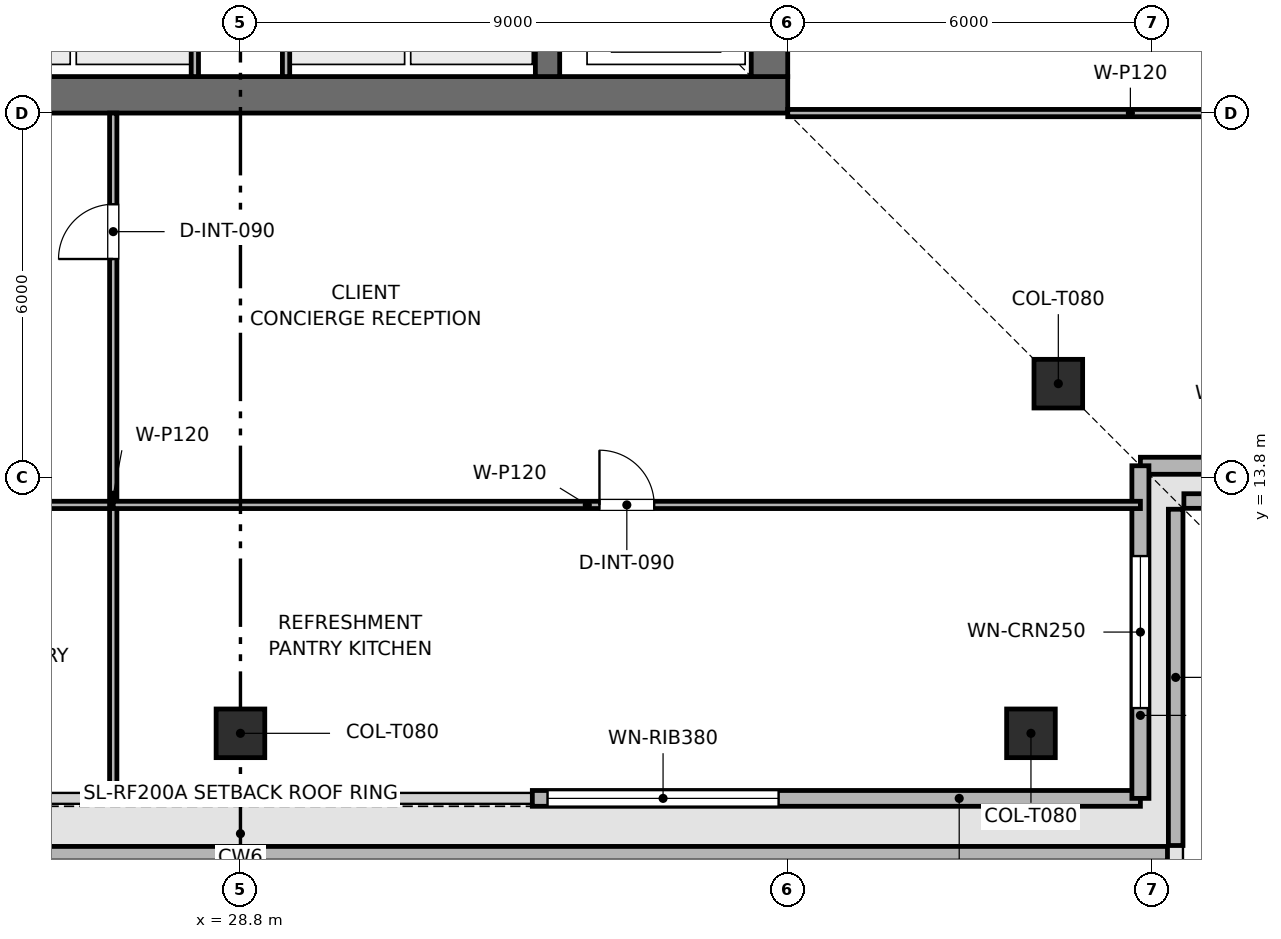
"""IFC4 building model, lengths in metres.
Left out: names, types, materials, properties, quantities, classifications, styles, units other than length and angle.
Written with IfcOpenShell. Run it as: python <this file> out.ifc"""

import sys

from ifc_helpers import new_model, si_unit, direction, frame, frame_2d, origin, origin_2d, place, context, subcontext, project, spatial, rectangle, extrude, element, fill, save


model = new_model("IFC4")
c1 = context("Model", 3, precision=1e-05, world=origin(), true_north=direction((0.0, 1.0)))
c2 = subcontext(c1, "Body", "Model", "MODEL_VIEW")
j1 = project(units=[si_unit("LENGTHUNIT", "METRE"), si_unit("PLANEANGLEUNIT", "RADIAN")], contexts=[c1])
p1 = place(None, origin())
s1 = spatial("IfcSite", under=j1, at=p1, CompositionType="ELEMENT")
p2 = place(p1, origin())
s2 = spatial("IfcBuilding", under=s1, at=p2, CompositionType="ELEMENT")
p3 = place(p2, frame((0.0, 0.0, 355.5)))
s3 = spatial("IfcBuildingStorey", under=s2, at=p3, CompositionType="ELEMENT", Elevation=355.5)
p4 = place(p3, frame((19.8, 20.1, 0.0), z_axis=(0.0, 0.0, 1.0), x_axis=(1.0, 0.0, 0.0)))
e1 = element("IfcWall", 1, at=p4, inside=s3, PredefinedType="SHEAR", context=c2, shape_type="SweptSolid", body=[
    extrude(rectangle(XDim=18.0, YDim=0.6, at=frame_2d((9.0, 0.0))), origin(), (0.0, 0.0, 1.0), 4.5),
])
p5 = place(p3, frame((37.5, 20.4, 0.0), z_axis=(0.0, 0.0, 1.0), x_axis=(0.0, 1.0, 0.0)))
e2 = element("IfcWall", 2, at=p5, inside=s3, PredefinedType="SHEAR", context=c2, shape_type="SweptSolid", body=[
    extrude(rectangle(XDim=16.8, YDim=0.6, at=frame_2d((8.4, 0.0))), origin(), (0.0, 0.0, 1.0), 4.5),
])
p6 = place(p5, frame((4.9, 0.0, 0.0)))
e3 = element("IfcOpeningElement", 3, at=p6, cuts=e2, PredefinedType="OPENING", context=c2, shape_type="SweptSolid", body=[
    extrude(rectangle(XDim=1.1, YDim=2.15, at=frame_2d((0.55, 1.075))), frame((0.0, 0.31, 0.0), z_axis=(0.0, -1.0, 0.0), x_axis=(1.0, 0.0, 0.0)), (0.0, 0.0, 1.0), 0.62),
])
p7 = place(p3, frame((33.85, 20.4, 0.0), z_axis=(0.0, 0.0, 1.0), x_axis=(0.0, 1.0, 0.0)))
e4 = element("IfcWall", 4, at=p7, inside=s3, PredefinedType="SHEAR", context=c2, shape_type="SweptSolid", body=[
    extrude(rectangle(XDim=16.8, YDim=0.4, at=frame_2d((8.4, 0.0))), origin(), (0.0, 0.0, 1.0), 4.5),
])
for number, where, z_axis, x_axis in (
    (5, (28.8, 9.6, 0.003), (0.0, 0.0, 1.0), (1.0, 0.0, 0.0)),
    (6, (41.8, 9.6, 0.003), (0.0, 0.0, 1.0), (1.0, 0.0, 0.0)),
    (7, (42.25, 15.35, 0.003), (0.0, 0.0, 1.0), (1.0, 0.0, 0.0)),
):
    element("IfcColumn", number, at=place(p3, frame(where, z_axis=z_axis, x_axis=x_axis)), inside=s3, PredefinedType="COLUMN", context=c2, shape_type="SweptSolid", body=[
        extrude(rectangle(XDim=0.8, YDim=0.8, at=origin_2d()), origin(), (0.0, 0.0, 1.0), 4.234),
    ])
p8 = place(p3, frame((13.555, 7.62, 0.0), z_axis=(0.0, 0.0, 1.0), x_axis=(1.0, 0.0, 0.0)))
e8 = element("IfcWall", 8, at=p8, inside=s3, PredefinedType="PARAPET", context=c2, shape_type="SweptSolid", body=[
    extrude(rectangle(XDim=30.49, YDim=0.24, at=frame_2d((15.245, 0.0))), origin(), (0.0, 0.0, 1.0), 1.2),
])
for number, where, z_axis, x_axis in (
    (9, (44.18, 7.755, 0.0), (0.0, 0.0, 1.0), (0.0, 1.0, 0.0)),
    (10, (44.315, 13.42, 0.0), (0.0, 0.0, 1.0), (1.0, 0.0, 0.0)),
):
    element("IfcWall", number, at=place(p3, frame(where, z_axis=z_axis, x_axis=x_axis)), inside=s3, PredefinedType="PARAPET", context=c2, shape_type="SweptSolid", body=[
        extrude(rectangle(XDim=5.53, YDim=0.24, at=frame_2d((2.765, 0.0))), origin(), (0.0, 0.0, 1.0), 1.2),
    ])
p9 = place(p3, frame((43.6, 8.53, 0.0), z_axis=(0.0, 0.0, 1.0), x_axis=(-1.0, 0.0, 0.0)))
e11 = element("IfcWall", 11, at=p9, inside=s3, PredefinedType="SOLIDWALL", context=c2, shape_type="SweptSolid", body=[
    extrude(rectangle(XDim=10.0, YDim=0.26, at=frame_2d((5.0, 0.0))), origin(), (0.0, 0.0, 1.0), 4.24),
])
p10 = place(p9, frame((5.95, 0.0, 0.9)))
e12 = element("IfcOpeningElement", 12, at=p10, cuts=e11, PredefinedType="OPENING", context=c2, shape_type="SweptSolid", body=[
    extrude(rectangle(XDim=3.8, YDim=1.9, at=frame_2d((1.9, 0.95))), frame((0.0, 0.14, 0.0), z_axis=(0.0, -1.0, 0.0), x_axis=(1.0, 0.0, 0.0)), (0.0, 0.0, 1.0), 0.28),
])
p11 = place(p3, frame((49.07, 14.0, 0.0), z_axis=(0.0, 0.0, 1.0), x_axis=(-1.0, 0.0, 0.0)))
e13 = element("IfcWall", 13, at=p11, inside=s3, PredefinedType="SOLIDWALL", context=c2, shape_type="SweptSolid", body=[
    extrude(rectangle(XDim=5.47, YDim=0.28, at=frame_2d((2.735, 0.0))), origin(), (0.0, 0.0, 1.0), 4.24),
])
p12 = place(p11, frame((1.485, 0.0, 0.9)))
e14 = element("IfcOpeningElement", 14, at=p12, cuts=e13, PredefinedType="OPENING", context=c2, shape_type="SweptSolid", body=[
    extrude(rectangle(XDim=2.5, YDim=1.9, at=frame_2d((1.25, 0.95))), frame((0.0, 0.15, 0.0), z_axis=(0.0, -1.0, 0.0), x_axis=(1.0, 0.0, 0.0)), (0.0, 0.0, 1.0), 0.3),
])
p13 = place(p3, frame((43.6, 14.0, 0.0), z_axis=(0.0, 0.0, 1.0), x_axis=(0.0, -1.0, 0.0)))
e15 = element("IfcWall", 15, at=p13, inside=s3, PredefinedType="SOLIDWALL", context=c2, shape_type="SweptSolid", body=[
    extrude(rectangle(XDim=5.47, YDim=0.28, at=frame_2d((2.735, 0.0))), origin(), (0.0, 0.0, 1.0), 4.24),
])
p14 = place(p13, frame((1.485, 0.0, 0.9)))
e16 = element("IfcOpeningElement", 16, at=p14, cuts=e15, PredefinedType="OPENING", context=c2, shape_type="SweptSolid", body=[
    extrude(rectangle(XDim=2.5, YDim=1.9, at=frame_2d((1.25, 0.95))), frame((0.0, 0.15, 0.0), z_axis=(0.0, -1.0, 0.0), x_axis=(1.0, 0.0, 0.0)), (0.0, 0.0, 1.0), 0.3),
])
for number, where, z_axis, x_axis in (
    (17, (28.05, 20.4, 0.0), (0.0, 0.0, 1.0), (0.0, 1.0, 0.0)),
    (18, (29.55, 20.4, 0.0), (0.0, 0.0, 1.0), (0.0, 1.0, 0.0)),
):
    element("IfcWall", number, at=place(p3, frame(where, z_axis=z_axis, x_axis=x_axis)), inside=s3, PredefinedType="PARTITIONING", context=c2, shape_type="SweptSolid", body=[
        extrude(rectangle(XDim=2.75, YDim=0.12, at=frame_2d((1.375, 0.0))), origin(), (0.0, 0.0, 1.0), 4.24),
    ])
p15 = place(p3, frame((19.8, 13.356, 0.0), z_axis=(0.0, 0.0, 1.0), x_axis=(1.0, 0.0, 0.0)))
e19 = element("IfcWall", 19, at=p15, inside=s3, PredefinedType="PARTITIONING", context=c2, shape_type="SweptSolid", body=[
    extrude(rectangle(XDim=6.908, YDim=0.12, at=frame_2d((3.454, 0.0))), origin(), (0.0, 0.0, 1.0), 3.825),
])
p16 = place(p15, frame((2.303, 0.0, 0.0)))
e20 = element("IfcOpeningElement", 20, at=p16, cuts=e19, PredefinedType="OPENING", context=c2, shape_type="SweptSolid", body=[
    extrude(rectangle(XDim=0.9, YDim=2.1, at=frame_2d((0.45, 1.05))), frame((0.0, 0.07, 0.0), z_axis=(0.0, -1.0, 0.0), x_axis=(1.0, 0.0, 0.0)), (0.0, 0.0, 1.0), 0.14),
])
p17 = place(p3, frame((26.708, 8.53, 0.0), z_axis=(0.0, 0.0, 1.0), x_axis=(0.0, 1.0, 0.0)))
e21 = element("IfcWall", 21, at=p17, inside=s3, PredefinedType="PARTITIONING", context=c2, shape_type="SweptSolid", body=[
    extrude(rectangle(XDim=11.27, YDim=0.12, at=frame_2d((5.635, 0.0))), origin(), (0.0, 0.0, 1.0), 3.865),
])
p18 = place(p17, frame((8.87, 0.0, 0.0)))
e22 = element("IfcOpeningElement", 22, at=p18, cuts=e21, PredefinedType="OPENING", context=c2, shape_type="SweptSolid", body=[
    extrude(rectangle(XDim=0.9, YDim=2.1, at=frame_2d((0.45, 1.05))), frame((0.0, 0.07, 0.0), z_axis=(0.0, -1.0, 0.0), x_axis=(1.0, 0.0, 0.0)), (0.0, 0.0, 1.0), 0.14),
])
p19 = place(p3, frame((26.708, 13.356, 0.0), z_axis=(0.0, 0.0, 1.0), x_axis=(1.0, 0.0, 0.0)))
e23 = element("IfcWall", 23, at=p19, inside=s3, PredefinedType="PARTITIONING", context=c2, shape_type="SweptSolid", body=[
    extrude(rectangle(XDim=16.892, YDim=0.12, at=frame_2d((8.446, 0.0))), origin(), (0.0, 0.0, 1.0), 3.825),
])
p20 = place(p19, frame((7.996, 0.0, 0.0)))
e24 = element("IfcOpeningElement", 24, at=p20, cuts=e23, PredefinedType="OPENING", context=c2, shape_type="SweptSolid", body=[
    extrude(rectangle(XDim=0.9, YDim=2.1, at=frame_2d((0.45, 1.05))), frame((0.0, 0.07, 0.0), z_axis=(0.0, -1.0, 0.0), x_axis=(1.0, 0.0, 0.0)), (0.0, 0.0, 1.0), 0.14),
])
p21 = place(p3, frame((37.8, 19.8, 0.0), z_axis=(0.0, 0.0, 1.0), x_axis=(1.0, 0.0, 0.0)))
e25 = element("IfcWall", 25, at=p21, inside=s3, PredefinedType="PARTITIONING", context=c2, shape_type="SweptSolid", body=[
    extrude(rectangle(XDim=11.27, YDim=0.12, at=frame_2d((5.635, 0.0))), origin(), (0.0, 0.0, 1.0), 3.825),
])
p22 = place(p10, origin())
e26 = element("IfcWindow", 26, at=p22, inside=s3, PartitioningType="SINGLE_PANEL", PredefinedType="WINDOW", context=c2, shape_type="SweptSolid", body=[
    extrude(rectangle(XDim=3.8, YDim=1.9, at=frame_2d((1.9, 0.95))), frame((0.0, 0.03, 0.0), z_axis=(0.0, -1.0, 0.0), x_axis=(1.0, 0.0, 0.0)), (0.0, 0.0, 1.0), 0.06),
])
fill(e12, e26)
p23 = place(p14, origin())
e27 = element("IfcWindow", 27, at=p23, inside=s3, PartitioningType="SINGLE_PANEL", PredefinedType="WINDOW", context=c2, shape_type="SweptSolid", body=[
    extrude(rectangle(XDim=2.5, YDim=1.9, at=frame_2d((1.25, 0.95))), frame((0.0, 0.03, 0.0), z_axis=(0.0, -1.0, 0.0), x_axis=(1.0, 0.0, 0.0)), (0.0, 0.0, 1.0), 0.06),
])
fill(e16, e27)
p24 = place(p18, origin())
e28 = element("IfcDoor", 28, at=p24, inside=s3, OperationType="SINGLE_SWING_LEFT", PredefinedType="DOOR", context=c2, shape_type="SweptSolid", body=[
    extrude(rectangle(XDim=0.9, YDim=2.1, at=frame_2d((0.45, 1.05))), frame((0.0, 0.025, 0.0), z_axis=(0.0, -1.0, 0.0), x_axis=(1.0, 0.0, 0.0)), (0.0, 0.0, 1.0), 0.05),
])
fill(e22, e28)
p25 = place(p20, origin())
e29 = element("IfcDoor", 29, at=p25, inside=s3, OperationType="SINGLE_SWING_LEFT", PredefinedType="DOOR", context=c2, shape_type="SweptSolid", body=[
    extrude(rectangle(XDim=0.9, YDim=2.1, at=frame_2d((0.45, 1.05))), frame((0.0, 0.025, 0.0), z_axis=(0.0, -1.0, 0.0), x_axis=(1.0, 0.0, 0.0)), (0.0, 0.0, 1.0), 0.05),
])
fill(e24, e29)
save(model, sys.argv[1])
